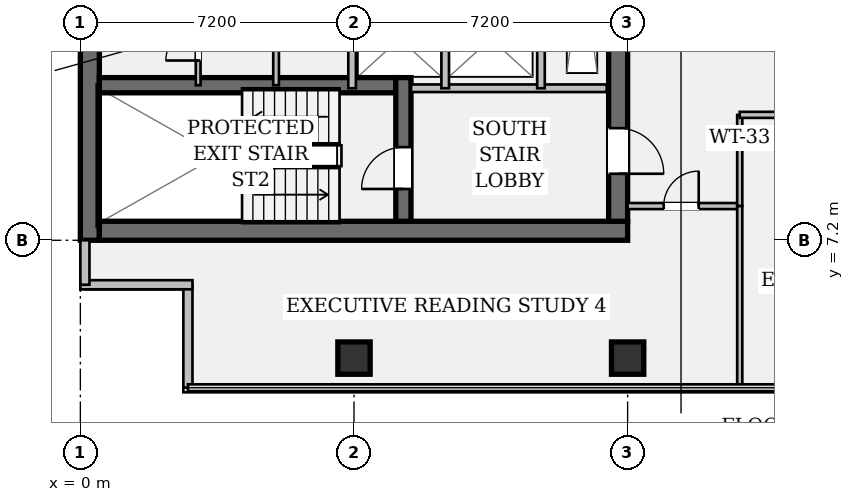
"""IFC4 building model, lengths in metres.
Left out: names, types, materials, properties, quantities, classifications, styles, units other than length and angle.
Written with IfcOpenShell. Run it as: python <this file> out.ifc"""

import sys

from ifc_helpers import new_model, si_unit, direction, frame, frame_2d, origin, origin_2d, place, context, subcontext, project, spatial, rectangle, hollow_rectangle, extrude, element, fill, save


model = new_model("IFC4")
c1 = context("Model", 3, precision=1e-05, world=origin(), true_north=direction((0.0, 1.0)))
c2 = subcontext(c1, "Body", "Model", "MODEL_VIEW")
j1 = project(units=[si_unit("LENGTHUNIT", "METRE"), si_unit("PLANEANGLEUNIT", "RADIAN")], contexts=[c1])
p1 = place(None, origin())
s1 = spatial("IfcSite", under=j1, at=p1, CompositionType="ELEMENT")
p2 = place(p1, origin())
s2 = spatial("IfcBuilding", under=s1, at=p2, CompositionType="ELEMENT")
p3 = place(p2, frame((0.0, 0.0, 173.25)))
s3 = spatial("IfcBuildingStorey", under=s2, at=p3, CompositionType="ELEMENT", Elevation=173.25)
p4 = place(p3, frame((0.25, 7.2, 0.0), z_axis=(0.0, 0.0, 1.0), x_axis=(0.0, 1.0, 0.0)))
e1 = element("IfcWall", 1, at=p4, inside=s3, PredefinedType="SHEAR", context=c2, shape_type="SweptSolid", body=[
    extrude(rectangle(XDim=28.8, YDim=0.5, at=frame_2d((14.4, 0.0))), origin(), (0.0, 0.0, 1.0), 3.24),
])
p5 = place(p3, frame((0.5, 7.45, 0.0), z_axis=(0.0, 0.0, 1.0), x_axis=(1.0, 0.0, 0.0)))
e2 = element("IfcWall", 2, at=p5, inside=s3, PredefinedType="SHEAR", context=c2, shape_type="SweptSolid", body=[
    extrude(rectangle(XDim=13.9, YDim=0.5, at=frame_2d((6.95, 0.0))), origin(), (0.0, 0.0, 1.0), 3.24),
])
p6 = place(p3, frame((14.15, 35.5, 0.0), z_axis=(0.0, 0.0, 1.0), x_axis=(0.0, -1.0, 0.0)))
e3 = element("IfcWall", 3, at=p6, inside=s3, PredefinedType="SHEAR", context=c2, shape_type="SweptSolid", body=[
    extrude(rectangle(XDim=27.8, YDim=0.5, at=frame_2d((13.9, 0.0))), origin(), (0.0, 0.0, 1.0), 3.24),
])
p7 = place(p6, frame((1.4, 0.0, 0.0)))
e4 = element("IfcOpeningElement", 4, at=p7, cuts=e3, PredefinedType="OPENING", context=c2, shape_type="SweptSolid", body=[
    extrude(rectangle(XDim=1.2, YDim=2.15, at=frame_2d((0.6, 1.075))), frame((0.0, 0.262, 0.0), z_axis=(0.0, -1.0, 0.0), x_axis=(1.0, 0.0, 0.0)), (0.0, 0.0, 1.0), 0.524),
])
p8 = place(p6, frame((25.35, 0.0, 0.0)))
e5 = element("IfcOpeningElement", 5, at=p8, cuts=e3, PredefinedType="OPENING", context=c2, shape_type="SweptSolid", body=[
    extrude(rectangle(XDim=1.2, YDim=2.15, at=frame_2d((0.6, 1.075))), frame((0.0, 0.262, 0.0), z_axis=(0.0, -1.0, 0.0), x_axis=(1.0, 0.0, 0.0)), (0.0, 0.0, 1.0), 0.524),
])
p9 = place(p6, frame((14.7, 0.0, 0.0)))
e6 = element("IfcOpeningElement", 6, at=p9, cuts=e3, PredefinedType="OPENING", context=c2, shape_type="SweptSolid", body=[
    extrude(rectangle(XDim=1.6, YDim=2.2, at=frame_2d((0.8, 1.1))), frame((0.0, 0.262, 0.0), z_axis=(0.0, -1.0, 0.0), x_axis=(1.0, 0.0, 0.0)), (0.0, 0.0, 1.0), 0.524),
])
p10 = place(p3, frame((0.5, 11.28, 0.0), z_axis=(0.0, 0.0, 1.0), x_axis=(1.0, 0.0, 0.0)))
e7 = element("IfcWall", 7, at=p10, inside=s3, PredefinedType="SHEAR", context=c2, shape_type="SweptSolid", body=[
    extrude(rectangle(XDim=7.8, YDim=0.4, at=frame_2d((3.9, 0.0))), origin(), (0.0, 0.0, 1.0), 3.24),
])
p11 = place(p3, frame((8.5, 7.7, 0.0), z_axis=(0.0, 0.0, 1.0), x_axis=(0.0, 1.0, 0.0)))
e8 = element("IfcWall", 8, at=p11, inside=s3, PredefinedType="SHEAR", context=c2, shape_type="SweptSolid", body=[
    extrude(rectangle(XDim=3.78, YDim=0.4, at=frame_2d((1.89, 0.0))), origin(), (0.0, 0.0, 1.0), 3.24),
])
p12 = place(p11, frame((0.85, 0.0, 0.0)))
e9 = element("IfcOpeningElement", 9, at=p12, cuts=e8, PredefinedType="OPENING", context=c2, shape_type="SweptSolid", body=[
    extrude(rectangle(XDim=1.1, YDim=2.15, at=frame_2d((0.55, 1.075))), frame((0.0, 0.212, 0.0), z_axis=(0.0, -1.0, 0.0), x_axis=(1.0, 0.0, 0.0)), (0.0, 0.0, 1.0), 0.424),
])
for number, where, z_axis, x_axis in (
    (10, (7.2, 4.1, 0.0), (0.0, 0.0, 1.0), (1.0, 0.0, 0.0)),
    (11, (14.4, 4.1, 0.0), (0.0, 0.0, 1.0), (1.0, 0.0, 0.0)),
):
    element("IfcColumn", number, at=place(p3, frame(where, z_axis=z_axis, x_axis=x_axis)), inside=s3, PredefinedType="COLUMN", context=c2, shape_type="SweptSolid", body=[
        extrude(hollow_rectangle(XDim=0.85, YDim=0.85, WallThickness=0.05, at=origin_2d()), origin(), (0.0, 0.0, 1.0), 3.24),
    ])
p13 = place(p3, frame((2.83, 3.32, 0.0), z_axis=(0.0, 0.0, 1.0), x_axis=(0.0, 1.0, 0.0)))
e12 = element("IfcWall", 12, at=p13, inside=s3, PredefinedType="STANDARD", context=c2, shape_type="SweptSolid", body=[
    extrude(rectangle(XDim=2.71, YDim=0.24, at=frame_2d((1.355, 0.0))), origin(), (0.0, 0.0, 1.0), 3.24),
])
p14 = place(p3, frame((2.95, 6.03, 0.0), z_axis=(0.0, 0.0, 1.0), x_axis=(-1.0, 0.0, 0.0)))
e13 = element("IfcWall", 13, at=p14, inside=s3, PredefinedType="STANDARD", context=c2, shape_type="SweptSolid", body=[
    extrude(rectangle(XDim=2.95, YDim=0.24, at=frame_2d((1.475, 0.0))), origin(), (0.0, 0.0, 1.0), 3.24),
])
p15 = place(p3, frame((0.12, 6.03, 0.0), z_axis=(0.0, 0.0, 1.0), x_axis=(0.0, 1.0, 0.0)))
e14 = element("IfcWall", 14, at=p15, inside=s3, PredefinedType="STANDARD", context=c2, shape_type="SweptSolid", body=[
    extrude(rectangle(XDim=1.17, YDim=0.24, at=frame_2d((0.585, 0.0))), origin(), (0.0, 0.0, 1.0), 3.24),
])
p16 = place(p3, frame((8.7, 11.2, 0.0), z_axis=(0.0, 0.0, 1.0), x_axis=(1.0, 0.0, 0.0)))
e15 = element("IfcWall", 15, at=p16, inside=s3, PredefinedType="PARTITIONING", context=c2, shape_type="SweptSolid", body=[
    extrude(rectangle(XDim=5.15, YDim=0.2, at=frame_2d((2.575, 0.0))), origin(), (0.0, 0.0, 1.0), 3.24),
])
for number, where, z_axis, x_axis in (
    (16, (7.15, 11.2, 0.0), (0.0, 0.0, 1.0), (0.0, 1.0, 0.0)),
    (17, (9.6, 11.2, 0.0), (0.0, 0.0, 1.0), (0.0, 1.0, 0.0)),
):
    element("IfcWall", number, at=place(p3, frame(where, z_axis=z_axis, x_axis=x_axis)), inside=s3, PredefinedType="PARTITIONING", context=c2, shape_type="SweptSolid", body=[
        extrude(rectangle(XDim=2.4, YDim=0.2, at=frame_2d((1.2, 0.0))), origin(), (0.0, 0.0, 1.0), 3.24),
    ])
p17 = place(p3, frame((12.12, 11.2, 0.0), z_axis=(0.0, 0.0, 1.0), x_axis=(0.0, 1.0, 0.0)))
e18 = element("IfcWall", 18, at=p17, inside=s3, PredefinedType="PARTITIONING", context=c2, shape_type="SweptSolid", body=[
    extrude(rectangle(XDim=6.6, YDim=0.2, at=frame_2d((3.3, 0.0))), origin(), (0.0, 0.0, 1.0), 3.24),
])
p18 = place(p17, frame((2.95, 0.0, 0.0)))
e19 = element("IfcOpeningElement", 19, at=p18, cuts=e18, PredefinedType="OPENING", context=c2, shape_type="SweptSolid", body=[
    extrude(rectangle(XDim=0.85, YDim=2.15, at=frame_2d((0.425, 1.075))), frame((0.0, 0.112, 0.0), z_axis=(0.0, -1.0, 0.0), x_axis=(1.0, 0.0, 0.0)), (0.0, 0.0, 1.0), 0.224),
])
p19 = place(p3, frame((5.15, 11.28, 0.0), z_axis=(0.0, 0.0, 1.0), x_axis=(0.0, 1.0, 0.0)))
e20 = element("IfcWall", 20, at=p19, inside=s3, PredefinedType="PARTITIONING", context=c2, shape_type="SweptSolid", body=[
    extrude(rectangle(XDim=4.42, YDim=0.15, at=frame_2d((2.21, 0.0))), origin(), (0.0, 0.0, 1.0), 3.24),
])
p20 = place(p3, frame((3.1, 11.28, 0.0), z_axis=(0.0, 0.0, 1.0), x_axis=(0.0, 1.0, 0.0)))
e21 = element("IfcWall", 21, at=p20, inside=s3, PredefinedType="PARTITIONING", context=c2, shape_type="SweptSolid", body=[
    extrude(rectangle(XDim=4.42, YDim=0.125, at=frame_2d((2.21, 0.0))), origin(), (0.0, 0.0, 1.0), 3.24),
])
p21 = place(p20, frame((0.65, 0.0, 0.0)))
e22 = element("IfcOpeningElement", 22, at=p21, cuts=e21, PredefinedType="OPENING", context=c2, shape_type="SweptSolid", body=[
    extrude(rectangle(XDim=0.85, YDim=2.15, at=frame_2d((0.425, 1.075))), frame((0.0, 0.074, 0.0), z_axis=(0.0, -1.0, 0.0), x_axis=(1.0, 0.0, 0.0)), (0.0, 0.0, 1.0), 0.149),
])
p22 = place(p20, frame((2.75, 0.0, 0.0)))
e23 = element("IfcOpeningElement", 23, at=p22, cuts=e21, PredefinedType="OPENING", context=c2, shape_type="SweptSolid", body=[
    extrude(rectangle(XDim=0.85, YDim=2.15, at=frame_2d((0.425, 1.075))), frame((0.0, 0.074, 0.0), z_axis=(0.0, -1.0, 0.0), x_axis=(1.0, 0.0, 0.0)), (0.0, 0.0, 1.0), 0.149),
])
p23 = place(p3, frame((14.4, 8.1, 0.0), z_axis=(0.0, 0.0, 1.0), x_axis=(1.0, 0.0, 0.0)))
e24 = element("IfcWall", 24, at=p23, inside=s3, PredefinedType="PARTITIONING", context=c2, shape_type="SweptSolid", body=[
    extrude(rectangle(XDim=2.95, YDim=0.16, at=frame_2d((1.475, 0.0))), origin(), (0.0, 0.0, 1.0), 2.808),
])
p24 = place(p23, frame((0.95, 0.0, 0.0)))
e25 = element("IfcOpeningElement", 25, at=p24, cuts=e24, PredefinedType="OPENING", context=c2, shape_type="SweptSolid", body=[
    extrude(rectangle(XDim=0.92, YDim=2.15, at=frame_2d((0.46, 1.075))), frame((0.0, 0.092, 0.0), z_axis=(0.0, -1.0, 0.0), x_axis=(1.0, 0.0, 0.0)), (0.0, 0.0, 1.0), 0.184),
])
p25 = place(p3, frame((17.35, 8.1, 0.0), z_axis=(0.0, 0.0, 1.0), x_axis=(0.0, 1.0, 0.0)))
e26 = element("IfcWall", 26, at=p25, inside=s3, PredefinedType="PARTITIONING", context=c2, shape_type="SweptSolid", body=[
    extrude(rectangle(XDim=2.4, YDim=0.135, at=frame_2d((1.2, 0.0))), origin(), (0.0, 0.0, 1.0), 3.24),
])
p26 = place(p3, frame((17.35, 10.5, 0.0), z_axis=(0.0, 0.0, 1.0), x_axis=(1.0, 0.0, 0.0)))
e27 = element("IfcWall", 27, at=p26, inside=s3, PredefinedType="PARTITIONING", context=c2, shape_type="SweptSolid", body=[
    extrude(rectangle(XDim=12.6, YDim=0.16, at=frame_2d((6.3, 0.0))), origin(), (0.0, 0.0, 1.0), 2.603),
])
p27 = place(p26, frame((3.12, 0.0, 0.0)))
e28 = element("IfcOpeningElement", 28, at=p27, cuts=e27, PredefinedType="OPENING", context=c2, shape_type="SweptSolid", body=[
    extrude(rectangle(XDim=0.92, YDim=2.15, at=frame_2d((0.46, 1.075))), frame((0.0, 0.092, 0.0), z_axis=(0.0, -1.0, 0.0), x_axis=(1.0, 0.0, 0.0)), (0.0, 0.0, 1.0), 0.184),
])
p28 = place(p26, frame((9.42, 0.0, 0.0)))
e29 = element("IfcOpeningElement", 29, at=p28, cuts=e27, PredefinedType="OPENING", context=c2, shape_type="SweptSolid", body=[
    extrude(rectangle(XDim=0.92, YDim=2.15, at=frame_2d((0.46, 1.075))), frame((0.0, 0.092, 0.0), z_axis=(0.0, -1.0, 0.0), x_axis=(1.0, 0.0, 0.0)), (0.0, 0.0, 1.0), 0.184),
])
p29 = place(p3, frame((17.35, 3.32, 0.0), z_axis=(0.0, 0.0, 1.0), x_axis=(0.0, 1.0, 0.0)))
e30 = element("IfcWall", 30, at=p29, inside=s3, PredefinedType="PARTITIONING", context=c2, shape_type="SweptSolid", body=[
    extrude(rectangle(XDim=4.78, YDim=0.135, at=frame_2d((2.39, 0.0))), origin(), (0.0, 0.0, 1.0), 2.603),
])
p30 = place(p12, origin())
e31 = element("IfcDoor", 31, at=p30, inside=s3, OperationType="SINGLE_SWING_LEFT", PredefinedType="DOOR", context=c2, shape_type="SweptSolid", body=[
    extrude(rectangle(XDim=1.1, YDim=2.15, at=frame_2d((0.55, 1.075))), frame((0.0, 0.025, 0.0), z_axis=(0.0, -1.0, 0.0), x_axis=(1.0, 0.0, 0.0)), (0.0, 0.0, 1.0), 0.05),
])
fill(e9, e31)
p31 = place(p8, origin())
e32 = element("IfcDoor", 32, at=p31, inside=s3, OperationType="SINGLE_SWING_RIGHT", PredefinedType="DOOR", context=c2, shape_type="SweptSolid", body=[
    extrude(rectangle(XDim=1.2, YDim=2.15, at=frame_2d((0.6, 1.075))), frame((0.0, 0.025, 0.0), z_axis=(0.0, -1.0, 0.0), x_axis=(1.0, 0.0, 0.0)), (0.0, 0.0, 1.0), 0.05),
])
fill(e5, e32)
p32 = place(p21, origin())
e33 = element("IfcDoor", 33, at=p32, inside=s3, OperationType="SINGLE_SWING_LEFT", PredefinedType="DOOR", context=c2, shape_type="SweptSolid", body=[
    extrude(rectangle(XDim=0.85, YDim=2.15, at=frame_2d((0.425, 1.075))), frame((0.0, 0.025, 0.0), z_axis=(0.0, -1.0, 0.0), x_axis=(1.0, 0.0, 0.0)), (0.0, 0.0, 1.0), 0.05),
])
fill(e22, e33)
p33 = place(p24, origin())
e34 = element("IfcDoor", 34, at=p33, inside=s3, OperationType="SINGLE_SWING_RIGHT", PredefinedType="DOOR", context=c2, shape_type="SweptSolid", body=[
    extrude(rectangle(XDim=0.92, YDim=2.15, at=frame_2d((0.46, 1.075))), frame((0.0, 0.025, 0.0), z_axis=(0.0, -1.0, 0.0), x_axis=(1.0, 0.0, 0.0)), (0.0, 0.0, 1.0), 0.05),
])
fill(e25, e34)
save(model, sys.argv[1])
